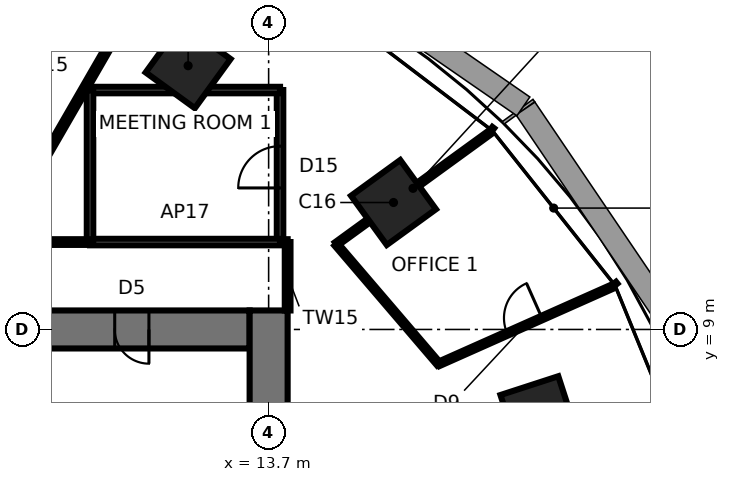
"""IFC4 building model, lengths in metres.
Left out: names, types, materials, properties, quantities, classifications, styles, units other than length and angle.
Written with IfcOpenShell. Run it as: python <this file> out.ifc"""

import sys

from ifc_helpers import new_model, si_unit, direction, frame, frame_2d, origin, origin_2d, place, context, subcontext, project, spatial, rectangle, extrude, element, fill, save


model = new_model("IFC4")
c1 = context("Model", 3, precision=1e-05, world=origin(), true_north=direction((0.0, 1.0)))
c2 = subcontext(c1, "Body", "Model", "MODEL_VIEW")
j1 = project(units=[si_unit("LENGTHUNIT", "METRE"), si_unit("PLANEANGLEUNIT", "RADIAN")], contexts=[c1])
p1 = place(None, origin())
s1 = spatial("IfcSite", under=j1, at=p1, CompositionType="ELEMENT")
p2 = place(p1, origin())
s2 = spatial("IfcBuilding", under=s1, at=p2, CompositionType="ELEMENT")
p3 = place(p2, frame((0.0, 0.0, 147.0)))
s3 = spatial("IfcBuildingStorey", under=s2, at=p3, CompositionType="ELEMENT", Elevation=147.0)
for number, where, z_axis, x_axis in (
    (1, (20.808, 6.761, 0.0), (0.0, 0.0, 1.0), (0.951, 0.309, 0.0)),
    (2, (16.986, 12.341, 0.0), (0.0, 0.0, 1.0), (0.809, 0.588, 0.0)),
    (3, (11.581, 15.94, 0.0), (0.0, 0.0, 1.0), (0.588, 0.809, 0.0)),
):
    element("IfcColumn", number, at=place(p3, frame(where, z_axis=z_axis, x_axis=x_axis)), inside=s3, PredefinedType="COLUMN", context=c2, shape_type="SweptSolid", body=[
        extrude(rectangle(XDim=1.6, YDim=1.6, at=origin_2d()), origin(), (0.0, 0.0, 1.0), 3.9),
    ])
p4 = place(p3, frame((13.2, 9.0, 0.0), z_axis=(0.0, 0.0, 1.0), x_axis=(-1.0, 0.0, 0.0)))
e4 = element("IfcWall", 4, at=p4, inside=s3, PredefinedType="SHEAR", context=c2, shape_type="SweptSolid", body=[
    extrude(rectangle(XDim=26.4, YDim=1.0, at=frame_2d((13.2, 0.0))), origin(), (0.0, 0.0, 1.0), 3.9),
])
p5 = place(p4, frame((2.65, 0.0, 0.0)))
e5 = element("IfcOpeningElement", 5, at=p5, cuts=e4, PredefinedType="OPENING", context=c2, shape_type="SweptSolid", body=[
    extrude(rectangle(XDim=0.9, YDim=2.1, at=frame_2d((0.45, 1.05))), frame((0.0, 0.51, 0.0), z_axis=(0.0, -1.0, 0.0), x_axis=(1.0, 0.0, 0.0)), (0.0, 0.0, 1.0), 1.02),
])
p6 = place(p4, frame((9.5, 0.0, 0.0)))
e6 = element("IfcOpeningElement", 6, at=p6, cuts=e4, PredefinedType="OPENING", context=c2, shape_type="SweptSolid", body=[
    extrude(rectangle(XDim=0.9, YDim=2.1, at=frame_2d((0.45, 1.05))), frame((0.0, 0.51, 0.0), z_axis=(0.0, -1.0, 0.0), x_axis=(1.0, 0.0, 0.0)), (0.0, 0.0, 1.0), 1.02),
])
p7 = place(p4, frame((16.0, 0.0, 0.0)))
e7 = element("IfcOpeningElement", 7, at=p7, cuts=e4, PredefinedType="OPENING", context=c2, shape_type="SweptSolid", body=[
    extrude(rectangle(XDim=0.9, YDim=2.1, at=frame_2d((0.45, 1.05))), frame((0.0, 0.51, 0.0), z_axis=(0.0, -1.0, 0.0), x_axis=(1.0, 0.0, 0.0)), (0.0, 0.0, 1.0), 1.02),
])
p8 = place(p4, frame((21.25, 0.0, 0.0)))
e8 = element("IfcOpeningElement", 8, at=p8, cuts=e4, PredefinedType="OPENING", context=c2, shape_type="SweptSolid", body=[
    extrude(rectangle(XDim=0.9, YDim=2.1, at=frame_2d((0.45, 1.05))), frame((0.0, 0.51, 0.0), z_axis=(0.0, -1.0, 0.0), x_axis=(1.0, 0.0, 0.0)), (0.0, 0.0, 1.0), 1.02),
])
p9 = place(p4, frame((24.8, 0.0, 0.0)))
e9 = element("IfcOpeningElement", 9, at=p9, cuts=e4, PredefinedType="OPENING", context=c2, shape_type="SweptSolid", body=[
    extrude(rectangle(XDim=1.0, YDim=2.1, at=frame_2d((0.5, 1.05))), frame((0.0, 0.51, 0.0), z_axis=(0.0, -1.0, 0.0), x_axis=(1.0, 0.0, 0.0)), (0.0, 0.0, 1.0), 1.02),
])
p10 = place(p3, frame((13.7, -9.5, 0.0), z_axis=(0.0, 0.0, 1.0), x_axis=(0.0, 1.0, 0.0)))
e10 = element("IfcWall", 10, at=p10, inside=s3, PredefinedType="SHEAR", context=c2, shape_type="SweptSolid", body=[
    extrude(rectangle(XDim=19.0, YDim=1.0, at=frame_2d((9.5, 0.0))), origin(), (0.0, 0.0, 1.0), 3.9),
])
p11 = place(p10, frame((8.6, 0.0, 0.0)))
e11 = element("IfcOpeningElement", 11, at=p11, cuts=e10, PredefinedType="OPENING", context=c2, shape_type="SweptSolid", body=[
    extrude(rectangle(XDim=1.8, YDim=2.4, at=frame_2d((0.9, 1.2))), frame((0.0, 0.51, 0.0), z_axis=(0.0, -1.0, 0.0), x_axis=(1.0, 0.0, 0.0)), (0.0, 0.0, 1.0), 1.02),
])
p12 = place(p3, frame((18.175, 8.092, 0.0), z_axis=(0.0, 0.0, 1.0), x_axis=(0.913541529049, 0.406745466726, 0.0)))
e12 = element("IfcWall", 12, at=p12, inside=s3, PredefinedType="PARTITIONING", context=c2, shape_type="SweptSolid", body=[
    extrude(rectangle(XDim=5.0, YDim=0.12, at=frame_2d((2.5, 0.0))), origin(), (0.0, 0.0, 1.0), 3.74),
])
p13 = place(p12, frame((1.975, 0.0, 0.0)))
e13 = element("IfcOpeningElement", 13, at=p13, cuts=e12, PredefinedType="OPENING", context=c2, shape_type="SweptSolid", body=[
    extrude(rectangle(XDim=1.0, YDim=2.4, at=frame_2d((0.5, 1.2))), frame((0.0, 0.07, 0.0), z_axis=(0.0, -1.0, 0.0), x_axis=(1.0, 0.0, 0.0)), (0.0, 0.0, 1.0), 0.14),
])
p14 = place(p3, frame((15.477, 11.244, 0.0), z_axis=(0.0, 0.0, 1.0), x_axis=(0.650204888553, -0.759758911038, 0.0)))
e14 = element("IfcWall", 14, at=p14, inside=s3, PredefinedType="PARTITIONING", context=c2, shape_type="SweptSolid", body=[
    extrude(rectangle(XDim=4.149, YDim=0.12, at=frame_2d((2.075, 0.0))), origin(), (0.0, 0.0, 1.0), 3.286),
])
p15 = place(p3, frame((19.521, 14.183, 0.0), z_axis=(0.0, 0.0, 1.0), x_axis=(-0.809025274756, -0.587773855157, 0.0)))
e15 = element("IfcWall", 15, at=p15, inside=s3, PredefinedType="PARTITIONING", context=c2, shape_type="SweptSolid", body=[
    extrude(rectangle(XDim=5.0, YDim=0.12, at=frame_2d((2.5, 0.0))), origin(), (0.0, 0.0, 1.0), 2.94),
])
p16 = place(p3, frame((14.2, 9.5, 0.0), z_axis=(0.0, 0.0, 1.0), x_axis=(0.0, 1.0, 0.0)))
e16 = element("IfcWall", 16, at=p16, inside=s3, PredefinedType="PARTITIONING", context=c2, shape_type="SweptSolid", body=[
    extrude(rectangle(XDim=1.8, YDim=0.15, at=frame_2d((0.9, 0.0))), origin(), (0.0, 0.0, 1.0), 3.74),
])
p17 = place(p3, frame((14.2, 11.3, 0.0), z_axis=(0.0, 0.0, 1.0), x_axis=(-1.0, 0.0, 0.0)))
e17 = element("IfcWall", 17, at=p17, inside=s3, PredefinedType="PARTITIONING", context=c2, shape_type="SweptSolid", body=[
    extrude(rectangle(XDim=0.2, YDim=0.15, at=frame_2d((0.1, 0.0))), origin(), (0.0, 0.0, 1.0), 3.74),
])
p18 = place(p3, frame((14.0, 11.3, 0.0), z_axis=(0.0, 0.0, 1.0), x_axis=(0.0, 1.0, 0.0)))
e18 = element("IfcWall", 18, at=p18, inside=s3, PredefinedType="PARTITIONING", context=c2, shape_type="SweptSolid", body=[
    extrude(rectangle(XDim=4.0, YDim=0.17, at=frame_2d((2.0, 0.0))), origin(), (0.0, 0.0, 1.0), 3.74),
])
p19 = place(p18, frame((1.424, 0.0, 0.0)))
e19 = element("IfcOpeningElement", 19, at=p19, cuts=e18, PredefinedType="OPENING", context=c2, shape_type="SweptSolid", body=[
    extrude(rectangle(XDim=1.1, YDim=2.4, at=frame_2d((0.55, 1.2))), frame((0.0, 0.095, 0.0), z_axis=(0.0, -1.0, 0.0), x_axis=(1.0, 0.0, 0.0)), (0.0, 0.0, 1.0), 0.19),
])
for number, where, z_axis, x_axis in (
    (20, (9.0, 11.3, 0.0), (0.0, 0.0, 1.0), (1.0, 0.0, 0.0)),
    (21, (14.0, 15.3, 0.0), (0.0, 0.0, 1.0), (-1.0, 0.0, 0.0)),
):
    element("IfcWall", number, at=place(p3, frame(where, z_axis=z_axis, x_axis=x_axis)), inside=s3, PredefinedType="PARTITIONING", context=c2, shape_type="SweptSolid", body=[
        extrude(rectangle(XDim=5.0, YDim=0.17, at=frame_2d((2.5, 0.0))), origin(), (0.0, 0.0, 1.0), 3.74),
    ])
p20 = place(p3, frame((9.0, 15.3, 0.0), z_axis=(0.0, 0.0, 1.0), x_axis=(0.0, -1.0, 0.0)))
e22 = element("IfcWall", 22, at=p20, inside=s3, PredefinedType="PARTITIONING", context=c2, shape_type="SweptSolid", body=[
    extrude(rectangle(XDim=4.0, YDim=0.17, at=frame_2d((2.0, 0.0))), origin(), (0.0, 0.0, 1.0), 3.74),
])
p21 = place(p3, frame((6.524, 11.3, 0.0), z_axis=(0.0, 0.0, 1.0), x_axis=(0.499995827671, 0.866027812666, 0.0)))
e23 = element("IfcWall", 23, at=p21, inside=s3, PredefinedType="PARTITIONING", context=c2, shape_type="SweptSolid", body=[
    extrude(rectangle(XDim=9.225, YDim=0.15, at=frame_2d((4.613, 0.0))), origin(), (0.0, 0.0, 1.0), 3.74),
])
p22 = place(p3, frame((9.0, 11.3, 0.0), z_axis=(0.0, 0.0, 1.0), x_axis=(-1.0, 0.0, 0.0)))
e24 = element("IfcWall", 24, at=p22, inside=s3, PredefinedType="PARTITIONING", context=c2, shape_type="SweptSolid", body=[
    extrude(rectangle(XDim=7.0, YDim=0.15, at=frame_2d((3.5, 0.0))), origin(), (0.0, 0.0, 1.0), 3.74),
])
p23 = place(p5, origin())
e25 = element("IfcDoor", 25, at=p23, inside=s3, OperationType="SINGLE_SWING_LEFT", PredefinedType="DOOR", context=c2, shape_type="SweptSolid", body=[
    extrude(rectangle(XDim=0.82, YDim=2.06, at=frame_2d((0.45, 1.03))), frame((0.0, 0.025, 0.0), z_axis=(0.0, -1.0, 0.0), x_axis=(1.0, 0.0, 0.0)), (0.0, 0.0, 1.0), 0.05),
    extrude(rectangle(XDim=0.04, YDim=2.1, at=frame_2d((0.02, 1.05))), frame((0.0, 0.25, 0.0), z_axis=(0.0, -1.0, 0.0), x_axis=(1.0, 0.0, 0.0)), (0.0, 0.0, 1.0), 0.5),
    extrude(rectangle(XDim=0.04, YDim=2.1, at=frame_2d((0.88, 1.05))), frame((0.0, 0.25, 0.0), z_axis=(0.0, -1.0, 0.0), x_axis=(1.0, 0.0, 0.0)), (0.0, 0.0, 1.0), 0.5),
    extrude(rectangle(XDim=0.82, YDim=0.04, at=frame_2d((0.45, 2.08))), frame((0.0, 0.25, 0.0), z_axis=(0.0, -1.0, 0.0), x_axis=(1.0, 0.0, 0.0)), (0.0, 0.0, 1.0), 0.5),
])
fill(e5, e25)
p24 = place(p13, origin())
e26 = element("IfcDoor", 26, at=p24, inside=s3, OperationType="SINGLE_SWING_RIGHT", PredefinedType="DOOR", context=c2, shape_type="SweptSolid", body=[
    extrude(rectangle(XDim=1.0, YDim=2.4, at=frame_2d((0.5, 1.2))), frame((0.0, 0.025, 0.0), z_axis=(0.0, -1.0, 0.0), x_axis=(1.0, 0.0, 0.0)), (0.0, 0.0, 1.0), 0.05),
])
fill(e13, e26)
p25 = place(p19, origin())
e27 = element("IfcDoor", 27, at=p25, inside=s3, OperationType="SINGLE_SWING_LEFT", PredefinedType="DOOR", context=c2, shape_type="SweptSolid", body=[
    extrude(rectangle(XDim=1.1, YDim=2.4, at=frame_2d((0.55, 1.2))), frame((0.0, 0.025, 0.0), z_axis=(0.0, -1.0, 0.0), x_axis=(1.0, 0.0, 0.0)), (0.0, 0.0, 1.0), 0.05),
])
fill(e19, e27)
save(model, sys.argv[1])
